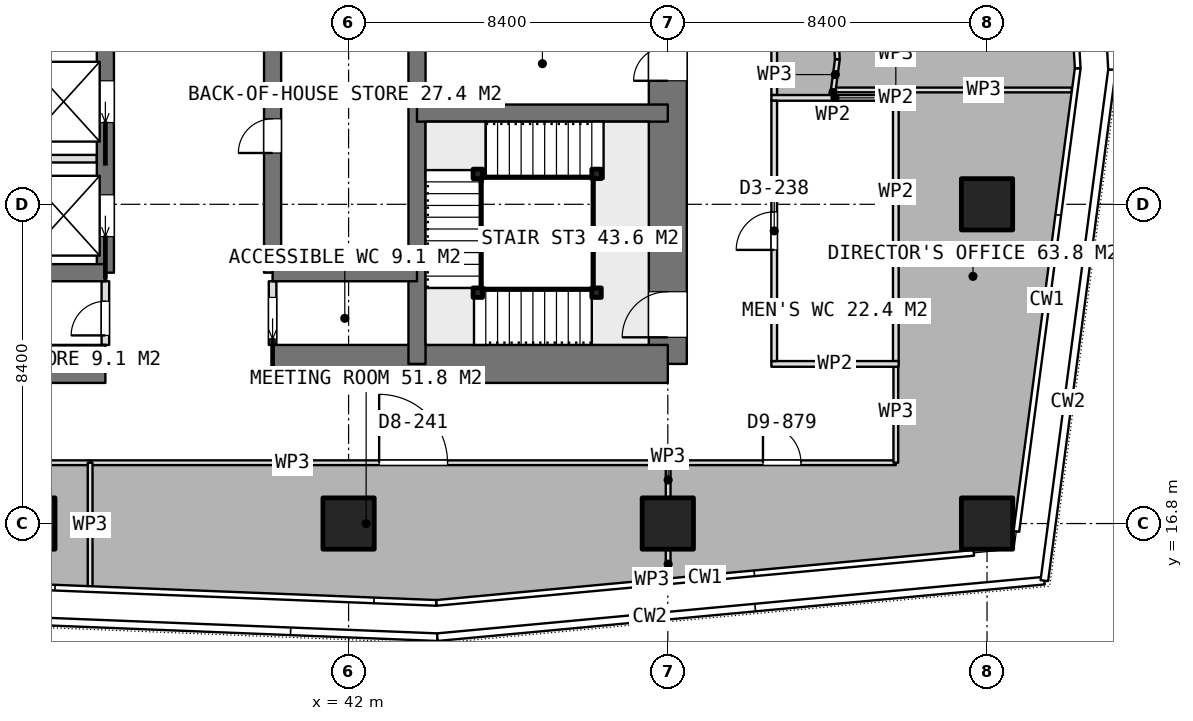
"""IFC4 building model, lengths in metres.
Left out: names, types, materials, properties, quantities, classifications, styles, units other than length and angle.
Written with IfcOpenShell. Run it as: python <this file> out.ifc"""

import sys

from ifc_helpers import new_model, si_unit, direction, frame, frame_2d, origin, origin_2d, place, context, subcontext, project, spatial, rectangle, extrude, element, fill, save


model = new_model("IFC4")
c1 = context("Model", 3, precision=1e-05, world=origin(), true_north=direction((0.0, 1.0)))
c2 = subcontext(c1, "Body", "Model", "MODEL_VIEW")
j1 = project(units=[si_unit("LENGTHUNIT", "METRE"), si_unit("PLANEANGLEUNIT", "RADIAN")], contexts=[c1])
p1 = place(None, origin())
s1 = spatial("IfcSite", under=j1, at=p1, CompositionType="ELEMENT")
p2 = place(p1, origin())
s2 = spatial("IfcBuilding", under=s1, at=p2, CompositionType="ELEMENT")
p3 = place(p2, frame((0.0, 0.0, 221.45)))
s3 = spatial("IfcBuildingStorey", under=s2, at=p3, CompositionType="ELEMENT", Elevation=221.45)
p4 = place(p3, frame((25.2, 21.0, 0.0), z_axis=(0.0, 0.0, 1.0), x_axis=(1.0, 0.0, 0.0)))
e1 = element("IfcWall", 1, at=p4, inside=s3, PredefinedType="SHEAR", context=c2, shape_type="SweptSolid", body=[
    extrude(rectangle(XDim=10.4, YDim=1.0, at=frame_2d((5.2, 0.0))), origin(), (0.0, 0.0, 1.0), 3.75),
])
p5 = place(p3, frame((40.0, 21.0, 0.0), z_axis=(0.0, 0.0, 1.0), x_axis=(1.0, 0.0, 0.0)))
e2 = element("IfcWall", 2, at=p5, inside=s3, PredefinedType="SHEAR", context=c2, shape_type="SweptSolid", body=[
    extrude(rectangle(XDim=10.4, YDim=1.0, at=frame_2d((5.2, 0.0))), origin(), (0.0, 0.0, 1.0), 3.75),
])
p6 = place(p3, frame((50.4, 21.0, 0.0), z_axis=(0.0, 0.0, 1.0), x_axis=(0.0, 1.0, 0.0)))
e3 = element("IfcWall", 3, at=p6, inside=s3, PredefinedType="SHEAR", context=c2, shape_type="SweptSolid", body=[
    extrude(rectangle(XDim=25.2, YDim=1.0, at=frame_2d((12.6, 0.0))), origin(), (0.0, 0.0, 1.0), 3.75),
])
p7 = place(p6, frame((16.2, 0.0, 0.0)))
e4 = element("IfcOpeningElement", 4, at=p7, cuts=e3, PredefinedType="OPENING", context=c2, shape_type="SweptSolid", body=[
    extrude(rectangle(XDim=1.2, YDim=2.1, at=frame_2d((0.6, 1.05))), frame((0.0, 0.51, 0.0), z_axis=(0.0, -1.0, 0.0), x_axis=(1.0, 0.0, 0.0)), (0.0, 0.0, 1.0), 1.02),
])
p8 = place(p6, frame((10.05, 0.0, 0.0)))
e5 = element("IfcOpeningElement", 5, at=p8, cuts=e3, PredefinedType="OPENING", context=c2, shape_type="SweptSolid", body=[
    extrude(rectangle(XDim=0.9, YDim=2.1, at=frame_2d((0.45, 1.05))), frame((0.0, 0.51, 0.0), z_axis=(0.0, -1.0, 0.0), x_axis=(1.0, 0.0, 0.0)), (0.0, 0.0, 1.0), 1.02),
])
p9 = place(p6, frame((7.45, 0.0, 0.0)))
e6 = element("IfcOpeningElement", 6, at=p9, cuts=e3, PredefinedType="OPENING", context=c2, shape_type="SweptSolid", body=[
    extrude(rectangle(XDim=0.9, YDim=2.1, at=frame_2d((0.45, 1.05))), frame((0.0, 0.51, 0.0), z_axis=(0.0, -1.0, 0.0), x_axis=(1.0, 0.0, 0.0)), (0.0, 0.0, 1.0), 1.02),
])
p10 = place(p6, frame((0.7, 0.0, 0.0)))
e7 = element("IfcOpeningElement", 7, at=p10, cuts=e3, PredefinedType="OPENING", context=c2, shape_type="SweptSolid", body=[
    extrude(rectangle(XDim=1.2, YDim=2.1, at=frame_2d((0.6, 1.05))), frame((0.0, 0.51, 0.0), z_axis=(0.0, -1.0, 0.0), x_axis=(1.0, 0.0, 0.0)), (0.0, 0.0, 1.0), 1.02),
])
p11 = place(p3, frame((43.8, 21.0, 0.0), z_axis=(0.0, 0.0, 1.0), x_axis=(0.0, 1.0, 0.0)))
e8 = element("IfcWall", 8, at=p11, inside=s3, PredefinedType="SHEAR", context=c2, shape_type="SweptSolid", body=[
    extrude(rectangle(XDim=25.2, YDim=0.45, at=frame_2d((12.6, 0.0))), origin(), (0.0, 0.0, 1.0), 3.75),
])
p12 = place(p3, frame((35.6, 23.4, 0.0), z_axis=(0.0, 0.0, 1.0), x_axis=(0.0, 1.0, 0.0)))
e9 = element("IfcWall", 9, at=p12, inside=s3, PredefinedType="SHEAR", context=c2, shape_type="SweptSolid", body=[
    extrude(rectangle(XDim=18.0, YDim=0.45, at=frame_2d((9.0, 0.0))), origin(), (0.0, 0.0, 1.0), 3.75),
])
p13 = place(p12, frame((0.95, 0.0, 0.0)))
e10 = element("IfcOpeningElement", 10, at=p13, cuts=e9, PredefinedType="OPENING", context=c2, shape_type="SweptSolid", body=[
    extrude(rectangle(XDim=1.1, YDim=2.1, at=frame_2d((0.55, 1.05))), frame((0.0, 0.235, 0.0), z_axis=(0.0, -1.0, 0.0), x_axis=(1.0, 0.0, 0.0)), (0.0, 0.0, 1.0), 0.47),
])
p14 = place(p12, frame((3.95, 0.0, 0.0)))
e11 = element("IfcOpeningElement", 11, at=p14, cuts=e9, PredefinedType="OPENING", context=c2, shape_type="SweptSolid", body=[
    extrude(rectangle(XDim=1.1, YDim=2.1, at=frame_2d((0.55, 1.05))), frame((0.0, 0.235, 0.0), z_axis=(0.0, -1.0, 0.0), x_axis=(1.0, 0.0, 0.0)), (0.0, 0.0, 1.0), 0.47),
])
p15 = place(p12, frame((6.95, 0.0, 0.0)))
e12 = element("IfcOpeningElement", 12, at=p15, cuts=e9, PredefinedType="OPENING", context=c2, shape_type="SweptSolid", body=[
    extrude(rectangle(XDim=1.1, YDim=2.1, at=frame_2d((0.55, 1.05))), frame((0.0, 0.235, 0.0), z_axis=(0.0, -1.0, 0.0), x_axis=(1.0, 0.0, 0.0)), (0.0, 0.0, 1.0), 0.47),
])
p16 = place(p12, frame((9.95, 0.0, 0.0)))
e13 = element("IfcOpeningElement", 13, at=p16, cuts=e9, PredefinedType="OPENING", context=c2, shape_type="SweptSolid", body=[
    extrude(rectangle(XDim=1.1, YDim=2.1, at=frame_2d((0.55, 1.05))), frame((0.0, 0.235, 0.0), z_axis=(0.0, -1.0, 0.0), x_axis=(1.0, 0.0, 0.0)), (0.0, 0.0, 1.0), 0.47),
])
p17 = place(p12, frame((12.95, 0.0, 0.0)))
e14 = element("IfcOpeningElement", 14, at=p17, cuts=e9, PredefinedType="OPENING", context=c2, shape_type="SweptSolid", body=[
    extrude(rectangle(XDim=1.1, YDim=2.1, at=frame_2d((0.55, 1.05))), frame((0.0, 0.235, 0.0), z_axis=(0.0, -1.0, 0.0), x_axis=(1.0, 0.0, 0.0)), (0.0, 0.0, 1.0), 0.47),
])
p18 = place(p12, frame((15.95, 0.0, 0.0)))
e15 = element("IfcOpeningElement", 15, at=p18, cuts=e9, PredefinedType="OPENING", context=c2, shape_type="SweptSolid", body=[
    extrude(rectangle(XDim=1.1, YDim=2.1, at=frame_2d((0.55, 1.05))), frame((0.0, 0.235, 0.0), z_axis=(0.0, -1.0, 0.0), x_axis=(1.0, 0.0, 0.0)), (0.0, 0.0, 1.0), 0.47),
])
p19 = place(p3, frame((40.0, 23.4, 0.0), z_axis=(0.0, 0.0, 1.0), x_axis=(0.0, 1.0, 0.0)))
e16 = element("IfcWall", 16, at=p19, inside=s3, PredefinedType="SHEAR", context=c2, shape_type="SweptSolid", body=[
    extrude(rectangle(XDim=18.0, YDim=0.45, at=frame_2d((9.0, 0.0))), origin(), (0.0, 0.0, 1.0), 3.75),
])
p20 = place(p19, frame((3.15, 0.0, 0.0)))
e17 = element("IfcOpeningElement", 17, at=p20, cuts=e16, PredefinedType="OPENING", context=c2, shape_type="SweptSolid", body=[
    extrude(rectangle(XDim=0.9, YDim=2.1, at=frame_2d((0.45, 1.05))), frame((0.0, 0.235, 0.0), z_axis=(0.0, -1.0, 0.0), x_axis=(1.0, 0.0, 0.0)), (0.0, 0.0, 1.0), 0.47),
])
p21 = place(p19, frame((9.1, 0.0, 0.0)))
e18 = element("IfcOpeningElement", 18, at=p21, cuts=e16, PredefinedType="OPENING", context=c2, shape_type="SweptSolid", body=[
    extrude(rectangle(XDim=1.0, YDim=2.1, at=frame_2d((0.5, 1.05))), frame((0.0, 0.235, 0.0), z_axis=(0.0, -1.0, 0.0), x_axis=(1.0, 0.0, 0.0)), (0.0, 0.0, 1.0), 0.47),
])
for number, where, z_axis, x_axis in (
    (19, (31.8, 23.4, 0.0), (0.0, 0.0, 1.0), (1.0, 0.0, 0.0)),
    (20, (40.0, 23.4, 0.0), (0.0, 0.0, 1.0), (1.0, 0.0, 0.0)),
):
    element("IfcWall", number, at=place(p3, frame(where, z_axis=z_axis, x_axis=x_axis)), inside=s3, PredefinedType="SHEAR", context=c2, shape_type="SweptSolid", body=[
        extrude(rectangle(XDim=3.8, YDim=0.45, at=frame_2d((1.9, 0.0))), origin(), (0.0, 0.0, 1.0), 3.75),
    ])
p22 = place(p3, frame((43.8, 27.6, 0.0), z_axis=(0.0, 0.0, 1.0), x_axis=(1.0, 0.0, 0.0)))
e21 = element("IfcWall", 21, at=p22, inside=s3, PredefinedType="SHEAR", context=c2, shape_type="SweptSolid", body=[
    extrude(rectangle(XDim=6.6, YDim=0.45, at=frame_2d((3.3, 0.0))), origin(), (0.0, 0.0, 1.0), 3.75),
])
for number, where, z_axis, x_axis in (
    (22, (33.6, 16.8, 0.0), (0.0, 0.0, 1.0), (1.0, 0.0, 0.0)),
    (23, (42.0, 16.8, 0.0), (0.0, 0.0, 1.0), (1.0, 0.0, 0.0)),
    (24, (50.4, 16.8, 0.0), (0.0, 0.0, 1.0), (1.0, 0.0, 0.0)),
    (25, (58.8, 16.8, 0.0), (0.0, 0.0, 1.0), (1.0, 0.0, 0.0)),
    (26, (58.8, 25.2, 0.0), (0.0, 0.0, 1.0), (1.0, 0.0, 0.0)),
):
    element("IfcColumn", number, at=place(p3, frame(where, z_axis=z_axis, x_axis=x_axis)), inside=s3, PredefinedType="COLUMN", context=c2, shape_type="SweptSolid", body=[
        extrude(rectangle(XDim=1.35, YDim=1.35, at=origin_2d()), origin(), (0.0, 0.0, 1.0), 3.75),
    ])
p23 = place(p3, frame((32.025, 26.4, 0.0), z_axis=(0.0, 0.0, 1.0), x_axis=(1.0, 0.0, 0.0)))
e27 = element("IfcWall", 27, at=p23, inside=s3, PredefinedType="PARTITIONING", context=c2, shape_type="SweptSolid", body=[
    extrude(rectangle(XDim=3.35, YDim=0.2, at=frame_2d((1.675, 0.0))), origin(), (0.0, 0.0, 1.0), 3.5),
])
p24 = place(p3, frame((40.0, 21.5, 0.0), z_axis=(0.0, 0.0, 1.0), x_axis=(0.0, 1.0, 0.0)))
e28 = element("IfcWall", 28, at=p24, inside=s3, PredefinedType="PARTITIONING", context=c2, shape_type="SweptSolid", body=[
    extrude(rectangle(XDim=1.675, YDim=0.2, at=frame_2d((0.837, 0.0))), origin(), (0.0, 0.0, 1.0), 3.5),
])
p25 = place(p24, frame((0.15, 0.0, 0.0)))
e29 = element("IfcOpeningElement", 29, at=p25, cuts=e28, PredefinedType="OPENING", context=c2, shape_type="SweptSolid", body=[
    extrude(rectangle(XDim=1.1, YDim=2.1, at=frame_2d((0.55, 1.05))), frame((0.0, 0.11, 0.0), z_axis=(0.0, -1.0, 0.0), x_axis=(1.0, 0.0, 0.0)), (0.0, 0.0, 1.0), 0.22),
])
p26 = place(p3, frame((35.6, 21.5, 0.0), z_axis=(0.0, 0.0, 1.0), x_axis=(0.0, 1.0, 0.0)))
e30 = element("IfcWall", 30, at=p26, inside=s3, PredefinedType="PARTITIONING", context=c2, shape_type="SweptSolid", body=[
    extrude(rectangle(XDim=1.675, YDim=0.2, at=frame_2d((0.837, 0.0))), origin(), (0.0, 0.0, 1.0), 3.5),
])
p27 = place(p26, frame((0.25, 0.0, 0.0)))
e31 = element("IfcOpeningElement", 31, at=p27, cuts=e30, PredefinedType="OPENING", context=c2, shape_type="SweptSolid", body=[
    extrude(rectangle(XDim=0.9, YDim=2.1, at=frame_2d((0.45, 1.05))), frame((0.0, 0.11, 0.0), z_axis=(0.0, -1.0, 0.0), x_axis=(1.0, 0.0, 0.0)), (0.0, 0.0, 1.0), 0.22),
])
for number, where, z_axis, x_axis in (
    (32, (53.125, 21.0, 0.0), (0.0, 0.0, 1.0), (1.0, 0.0, 0.0)),
    (33, (53.125, 28.0, 0.0), (0.0, 0.0, 1.0), (1.0, 0.0, 0.0)),
):
    element("IfcWall", number, at=place(p3, frame(where, z_axis=z_axis, x_axis=x_axis)), inside=s3, PredefinedType="PARTITIONING", context=c2, shape_type="SweptSolid", body=[
        extrude(rectangle(XDim=3.35, YDim=0.15, at=frame_2d((1.675, 0.0))), origin(), (0.0, 0.0, 1.0), 3.5),
    ])
p28 = place(p3, frame((53.2, 21.075, 0.0), z_axis=(0.0, 0.0, 1.0), x_axis=(0.0, 1.0, 0.0)))
e34 = element("IfcWall", 34, at=p28, inside=s3, PredefinedType="PARTITIONING", context=c2, shape_type="SweptSolid", body=[
    extrude(rectangle(XDim=6.85, YDim=0.15, at=frame_2d((3.425, 0.0))), origin(), (0.0, 0.0, 1.0), 3.5),
])
p29 = place(p28, frame((2.925, 0.0, 0.0)))
e35 = element("IfcOpeningElement", 35, at=p29, cuts=e34, PredefinedType="OPENING", context=c2, shape_type="SweptSolid", body=[
    extrude(rectangle(XDim=1.0, YDim=2.1, at=frame_2d((0.5, 1.05))), frame((0.0, 0.085, 0.0), z_axis=(0.0, -1.0, 0.0), x_axis=(1.0, 0.0, 0.0)), (0.0, 0.0, 1.0), 0.17),
])
p30 = place(p3, frame((56.4, 21.075, 0.0), z_axis=(0.0, 0.0, 1.0), x_axis=(0.0, 1.0, 0.0)))
e36 = element("IfcWall", 36, at=p30, inside=s3, PredefinedType="PARTITIONING", context=c2, shape_type="SweptSolid", body=[
    extrude(rectangle(XDim=6.85, YDim=0.15, at=frame_2d((3.425, 0.0))), origin(), (0.0, 0.0, 1.0), 3.5),
])
p31 = place(p3, frame((35.199, 18.4, 0.0), z_axis=(0.0, 0.0, 1.0), x_axis=(1.0, 0.0, 0.0)))
e37 = element("IfcWall", 37, at=p31, inside=s3, PredefinedType="PARTITIONING", context=c2, shape_type="SweptSolid", body=[
    extrude(rectangle(XDim=15.21, YDim=0.125, at=frame_2d((7.605, 0.0))), origin(), (0.0, 0.0, 1.0), 3.5),
])
p32 = place(p31, frame((7.605, 0.0, 0.0)))
e38 = element("IfcOpeningElement", 38, at=p32, cuts=e37, PredefinedType="OPENING", context=c2, shape_type="SweptSolid", body=[
    extrude(rectangle(XDim=1.8, YDim=2.1, at=frame_2d((0.9, 1.05))), frame((0.0, 0.073, 0.0), z_axis=(0.0, -1.0, 0.0), x_axis=(1.0, 0.0, 0.0)), (0.0, 0.0, 1.0), 0.145),
])
p33 = place(p3, frame((50.409, 18.4, 0.0), z_axis=(0.0, 0.0, 1.0), x_axis=(0.0, -1.0, 0.0)))
e39 = element("IfcWall", 39, at=p33, inside=s3, PredefinedType="PARTITIONING", context=c2, shape_type="SweptSolid", body=[
    extrude(rectangle(XDim=0.905, YDim=0.125, at=frame_2d((0.452, 0.0))), origin(), (0.0, 0.0, 1.0), 3.5),
])
p34 = place(p3, frame((50.409, 16.105, 0.0), z_axis=(0.0, 0.0, 1.0), x_axis=(0.0, -1.0, 0.0)))
e40 = element("IfcWall", 40, at=p34, inside=s3, PredefinedType="PARTITIONING", context=c2, shape_type="SweptSolid", body=[
    extrude(rectangle(XDim=0.745, YDim=0.125, at=frame_2d((0.373, 0.0))), origin(), (0.0, 0.0, 1.0), 3.5),
])
p35 = place(p3, frame((35.199, 15.126, 0.0), z_axis=(0.0, 0.0, 1.0), x_axis=(0.0, 1.0, 0.0)))
e41 = element("IfcWall", 41, at=p35, inside=s3, PredefinedType="PARTITIONING", context=c2, shape_type="SweptSolid", body=[
    extrude(rectangle(XDim=3.274, YDim=0.125, at=frame_2d((1.637, 0.0))), origin(), (0.0, 0.0, 1.0), 3.5),
])
p36 = place(p3, frame((50.409, 18.4, 0.0), z_axis=(0.0, 0.0, 1.0), x_axis=(1.0, 0.0, 0.0)))
e42 = element("IfcWall", 42, at=p36, inside=s3, PredefinedType="PARTITIONING", context=c2, shape_type="SweptSolid", body=[
    extrude(rectangle(XDim=5.991, YDim=0.125, at=frame_2d((2.996, 0.0))), origin(), (0.0, 0.0, 1.0), 3.5),
])
p37 = place(p36, frame((2.495, 0.0, 0.0)))
e43 = element("IfcOpeningElement", 43, at=p37, cuts=e42, PredefinedType="OPENING", context=c2, shape_type="SweptSolid", body=[
    extrude(rectangle(XDim=1.0, YDim=2.1, at=frame_2d((0.5, 1.05))), frame((0.0, 0.073, 0.0), z_axis=(0.0, -1.0, 0.0), x_axis=(1.0, 0.0, 0.0)), (0.0, 0.0, 1.0), 0.145),
])
p38 = place(p3, frame((56.4, 18.4, 0.0), z_axis=(0.0, 0.0, 1.0), x_axis=(0.0, 1.0, 0.0)))
e44 = element("IfcWall", 44, at=p38, inside=s3, PredefinedType="PARTITIONING", context=c2, shape_type="SweptSolid", body=[
    extrude(rectangle(XDim=2.675, YDim=0.125, at=frame_2d((1.337, 0.0))), origin(), (0.0, 0.0, 1.0), 3.5),
])
p39 = place(p3, frame((56.4, 27.925, 0.0), z_axis=(0.0, 0.0, 1.0), x_axis=(0.0, 1.0, 0.0)))
e45 = element("IfcWall", 45, at=p39, inside=s3, PredefinedType="PARTITIONING", context=c2, shape_type="SweptSolid", body=[
    extrude(rectangle(XDim=0.283, YDim=0.125, at=frame_2d((0.142, 0.0))), origin(), (0.0, 0.0, 1.0), 3.5),
])
p40 = place(p3, frame((56.4, 28.208, 0.0), z_axis=(0.0, 0.0, 1.0), x_axis=(1.0, 0.0, 0.0)))
e46 = element("IfcWall", 46, at=p40, inside=s3, PredefinedType="PARTITIONING", context=c2, shape_type="SweptSolid", body=[
    extrude(rectangle(XDim=4.63, YDim=0.125, at=frame_2d((2.315, 0.0))), origin(), (0.0, 0.0, 1.0), 3.5),
])
p41 = place(p3, frame((56.4, 28.209, 0.0), z_axis=(0.0, 0.0, 1.0), x_axis=(-1.0, 0.0, 0.0)))
e47 = element("IfcWall", 47, at=p41, inside=s3, PredefinedType="PARTITIONING", context=c2, shape_type="SweptSolid", body=[
    extrude(rectangle(XDim=1.645, YDim=0.125, at=frame_2d((0.823, 0.0))), origin(), (0.0, 0.0, 1.0), 3.5),
])
p42 = place(p3, frame((54.755, 28.209, 0.0), z_axis=(0.0, 0.0, 1.0), x_axis=(0.131477079609, 0.991319210717, 0.0)))
e48 = element("IfcWall", 48, at=p42, inside=s3, PredefinedType="PARTITIONING", context=c2, shape_type="SweptSolid", body=[
    extrude(rectangle(XDim=0.815, YDim=0.125, at=frame_2d((0.408, 0.0))), origin(), (0.0, 0.0, 1.0), 3.5),
])
p43 = place(p3, frame((54.862, 29.017, 0.0), z_axis=(0.0, 0.0, 1.0), x_axis=(-0.056632031714, 0.99839511867, 0.0)))
e49 = element("IfcWall", 49, at=p43, inside=s3, PredefinedType="PARTITIONING", context=c2, shape_type="SweptSolid", body=[
    extrude(rectangle(XDim=9.553, YDim=0.125, at=frame_2d((4.777, 0.0))), origin(), (0.0, 0.0, 1.0), 3.5),
])
p44 = place(p43, frame((4.277, 0.0, 0.0)))
e50 = element("IfcOpeningElement", 50, at=p44, cuts=e49, PredefinedType="OPENING", context=c2, shape_type="SweptSolid", body=[
    extrude(rectangle(XDim=1.0, YDim=2.1, at=frame_2d((0.5, 1.05))), frame((0.0, 0.073, 0.0), z_axis=(0.0, -1.0, 0.0), x_axis=(1.0, 0.0, 0.0)), (0.0, 0.0, 1.0), 0.145),
])
p45 = place(p3, frame((26.704, 18.4, 0.0), z_axis=(0.0, 0.0, 1.0), x_axis=(1.0, 0.0, 0.0)))
e51 = element("IfcWall", 51, at=p45, inside=s3, PredefinedType="PARTITIONING", context=c2, shape_type="SweptSolid", body=[
    extrude(rectangle(XDim=8.494, YDim=0.125, at=frame_2d((4.247, 0.0))), origin(), (0.0, 0.0, 1.0), 3.5),
])
p46 = place(p45, frame((3.747, 0.0, 0.0)))
e52 = element("IfcOpeningElement", 52, at=p46, cuts=e51, PredefinedType="OPENING", context=c2, shape_type="SweptSolid", body=[
    extrude(rectangle(XDim=1.0, YDim=2.1, at=frame_2d((0.5, 1.05))), frame((0.0, 0.073, 0.0), z_axis=(0.0, -1.0, 0.0), x_axis=(1.0, 0.0, 0.0)), (0.0, 0.0, 1.0), 0.145),
])
p47 = place(p3, frame((54.755, 28.208, 0.0), z_axis=(0.0, 0.0, 1.0), x_axis=(-0.125602865169, -0.992080601696, 0.0)))
e53 = element("IfcWall", 53, at=p47, inside=s3, PredefinedType="PARTITIONING", context=c2, shape_type="SweptSolid", body=[
    extrude(rectangle(XDim=0.134, YDim=0.15, at=frame_2d((0.067, 0.0))), origin(), (0.0, 0.0, 1.0), 3.5),
])
p48 = place(p3, frame((53.2, 28.075, 0.0), z_axis=(0.0, 0.0, 1.0), x_axis=(0.0, 1.0, 0.0)))
e54 = element("IfcWall", 54, at=p48, inside=s3, PredefinedType="PARTITIONING", context=c2, shape_type="SweptSolid", body=[
    extrude(rectangle(XDim=24.5, YDim=0.15, at=frame_2d((12.25, 0.0))), origin(), (0.0, 0.0, 1.0), 3.5),
])
p49 = place(p48, frame((11.713, 0.0, 0.0)))
e55 = element("IfcOpeningElement", 55, at=p49, cuts=e54, PredefinedType="OPENING", context=c2, shape_type="SweptSolid", body=[
    extrude(rectangle(XDim=1.0, YDim=2.1, at=frame_2d((0.5, 1.05))), frame((0.0, 0.085, 0.0), z_axis=(0.0, -1.0, 0.0), x_axis=(1.0, 0.0, 0.0)), (0.0, 0.0, 1.0), 0.17),
])
for number, where, z_axis, x_axis in (
    (56, (48.525, 22.875, 0.0), (0.0, 0.0, 1.0), (1.0, 0.0, 0.0)),
    (57, (45.4, 22.875, 0.0), (0.0, 0.0, 1.0), (1.0, 0.0, 0.0)),
    (58, (45.4, 26.0, 0.0), (0.0, 0.0, 1.0), (1.0, 0.0, 0.0)),
    (59, (48.525, 26.0, 0.0), (0.0, 0.0, 1.0), (1.0, 0.0, 0.0)),
):
    element("IfcColumn", number, at=place(p3, frame(where, z_axis=z_axis, x_axis=x_axis)), inside=s3, PredefinedType="COLUMN", context=c2, shape_type="SweptSolid", body=[
        extrude(rectangle(XDim=0.25, YDim=0.25, at=origin_2d()), origin(), (0.0, 0.0, 1.0), 3.75),
    ])
p50 = place(p9, origin())
e60 = element("IfcDoor", 60, at=p50, inside=s3, OperationType="SINGLE_SWING_LEFT", PredefinedType="DOOR", context=c2, shape_type="SweptSolid", body=[
    extrude(rectangle(XDim=0.9, YDim=2.1, at=frame_2d((0.45, 1.05))), frame((0.0, 0.025, 0.0), z_axis=(0.0, -1.0, 0.0), x_axis=(1.0, 0.0, 0.0)), (0.0, 0.0, 1.0), 0.05),
])
fill(e6, e60)
p51 = place(p25, origin())
e61 = element("IfcDoor", 61, at=p51, inside=s3, OperationType="SLIDING_TO_LEFT", PredefinedType="DOOR", context=c2, shape_type="SweptSolid", body=[
    extrude(rectangle(XDim=1.1, YDim=2.1, at=frame_2d((0.55, 1.05))), frame((0.0, 0.025, 0.0), z_axis=(0.0, -1.0, 0.0), x_axis=(1.0, 0.0, 0.0)), (0.0, 0.0, 1.0), 0.05),
])
fill(e29, e61)
p52 = place(p27, origin())
e62 = element("IfcDoor", 62, at=p52, inside=s3, OperationType="SINGLE_SWING_LEFT", PredefinedType="DOOR", context=c2, shape_type="SweptSolid", body=[
    extrude(rectangle(XDim=0.9, YDim=2.1, at=frame_2d((0.45, 1.05))), frame((0.0, 0.025, 0.0), z_axis=(0.0, -1.0, 0.0), x_axis=(1.0, 0.0, 0.0)), (0.0, 0.0, 1.0), 0.05),
])
fill(e31, e62)
p53 = place(p20, origin())
e63 = element("IfcDoor", 63, at=p53, inside=s3, OperationType="SINGLE_SWING_LEFT", PredefinedType="DOOR", context=c2, shape_type="SweptSolid", body=[
    extrude(rectangle(XDim=0.9, YDim=2.1, at=frame_2d((0.45, 1.05))), frame((0.0, 0.025, 0.0), z_axis=(0.0, -1.0, 0.0), x_axis=(1.0, 0.0, 0.0)), (0.0, 0.0, 1.0), 0.05),
])
fill(e17, e63)
p54 = place(p13, origin())
e64 = element("IfcDoor", 64, at=p54, inside=s3, OperationType="SLIDING_TO_LEFT", PredefinedType="USERDEFINED", context=c2, shape_type="SweptSolid", body=[
    extrude(rectangle(XDim=1.1, YDim=2.1, at=frame_2d((0.55, 1.05))), frame((0.0, 0.025, 0.0), z_axis=(0.0, -1.0, 0.0), x_axis=(1.0, 0.0, 0.0)), (0.0, 0.0, 1.0), 0.05),
])
fill(e10, e64)
p55 = place(p14, origin())
e65 = element("IfcDoor", 65, at=p55, inside=s3, OperationType="SLIDING_TO_LEFT", PredefinedType="USERDEFINED", context=c2, shape_type="SweptSolid", body=[
    extrude(rectangle(XDim=1.1, YDim=2.1, at=frame_2d((0.55, 1.05))), frame((0.0, 0.025, 0.0), z_axis=(0.0, -1.0, 0.0), x_axis=(1.0, 0.0, 0.0)), (0.0, 0.0, 1.0), 0.05),
])
fill(e11, e65)
p56 = place(p29, origin())
e66 = element("IfcDoor", 66, at=p56, inside=s3, OperationType="SINGLE_SWING_LEFT", PredefinedType="DOOR", context=c2, shape_type="SweptSolid", body=[
    extrude(rectangle(XDim=1.0, YDim=2.1, at=frame_2d((0.5, 1.05))), frame((0.0, 0.025, 0.0), z_axis=(0.0, -1.0, 0.0), x_axis=(1.0, 0.0, 0.0)), (0.0, 0.0, 1.0), 0.05),
])
fill(e35, e66)
p57 = place(p32, origin())
e67 = element("IfcDoor", 67, at=p57, inside=s3, OperationType="DOUBLE_DOOR_SINGLE_SWING", PredefinedType="DOOR", context=c2, shape_type="SweptSolid", body=[
    extrude(rectangle(XDim=1.8, YDim=2.1, at=frame_2d((0.9, 1.05))), frame((0.0, 0.025, 0.0), z_axis=(0.0, -1.0, 0.0), x_axis=(1.0, 0.0, 0.0)), (0.0, 0.0, 1.0), 0.05),
])
fill(e38, e67)
p58 = place(p37, origin())
e68 = element("IfcDoor", 68, at=p58, inside=s3, OperationType="SINGLE_SWING_LEFT", PredefinedType="DOOR", context=c2, shape_type="SweptSolid", body=[
    extrude(rectangle(XDim=1.0, YDim=2.1, at=frame_2d((0.5, 1.05))), frame((0.0, 0.025, 0.0), z_axis=(0.0, -1.0, 0.0), x_axis=(1.0, 0.0, 0.0)), (0.0, 0.0, 1.0), 0.05),
])
fill(e43, e68)
p59 = place(p10, origin())
e69 = element("IfcDoor", 69, at=p59, inside=s3, OperationType="SINGLE_SWING_RIGHT", PredefinedType="DOOR", context=c2, shape_type="SweptSolid", body=[
    extrude(rectangle(XDim=1.2, YDim=2.1, at=frame_2d((0.6, 1.05))), frame((0.0, 0.025, 0.0), z_axis=(0.0, -1.0, 0.0), x_axis=(1.0, 0.0, 0.0)), (0.0, 0.0, 1.0), 0.05),
])
fill(e7, e69)
save(model, sys.argv[1])
